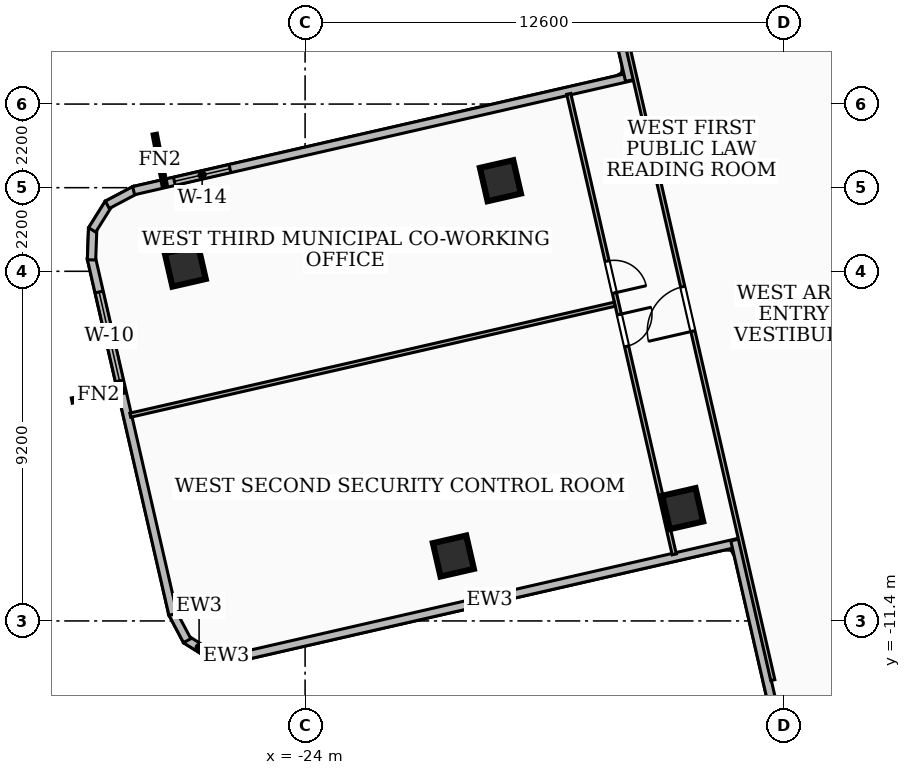
"""IFC4 building model, lengths in metres.
Left out: names, types, materials, properties, quantities, classifications, styles, units other than length and angle.
Written with IfcOpenShell. Run it as: python <this file> out.ifc"""

import sys

from ifc_helpers import new_model, si_unit, direction, frame, frame_2d, origin, origin_2d, place, context, subcontext, project, spatial, rectangle, extrude, element, fill, save


model = new_model("IFC4")
c1 = context("Model", 3, precision=1e-05, world=origin(), true_north=direction((0.0, 1.0)))
c2 = subcontext(c1, "Body", "Model", "MODEL_VIEW")
j1 = project(units=[si_unit("LENGTHUNIT", "METRE"), si_unit("PLANEANGLEUNIT", "RADIAN")], contexts=[c1])
p1 = place(None, origin())
s1 = spatial("IfcSite", under=j1, at=p1, CompositionType="ELEMENT")
p2 = place(p1, origin())
s2 = spatial("IfcBuilding", under=s1, at=p2, CompositionType="ELEMENT")
p3 = place(p2, frame((0.0, 0.0, 123.48)))
s3 = spatial("IfcBuildingStorey", under=s2, at=p3, CompositionType="ELEMENT", Elevation=123.48)
for number, where, z_axis, x_axis in (
    (1, (-18.86, 0.183, 0.0), (0.0, 0.0, 1.0), (0.975, 0.223, 0.0)),
    (2, (-14.064, -8.445, 0.0), (0.0, 0.0, 1.0), (0.975, 0.223, 0.0)),
    (3, (-27.153, -2.064, 0.0), (0.0, 0.0, 1.0), (0.975, 0.223, 0.0)),
    (4, (-20.098, -9.692, 0.0), (0.0, 0.0, 1.0), (0.975, 0.223, 0.0)),
):
    element("IfcColumn", number, at=place(p3, frame(where, z_axis=z_axis, x_axis=x_axis)), inside=s3, PredefinedType="COLUMN", context=c2, shape_type="SweptSolid", body=[
        extrude(rectangle(XDim=0.9, YDim=0.9, at=origin_2d()), origin(), (0.0, 0.0, 1.0), 3.6),
    ])
p4 = place(p3, frame((-12.585, -9.335, 0.0), z_axis=(0.0, 0.0, 1.0), x_axis=(-0.974754036658, -0.223281365141, 0.0)))
e5 = element("IfcWall", 5, at=p4, inside=s3, PredefinedType="SOLIDWALL", context=c2, shape_type="SweptSolid", body=[
    extrude(rectangle(XDim=13.459, YDim=0.22, at=frame_2d((6.729, 0.0))), origin(), (0.0, 0.0, 1.0), 2.644),
])
p5 = place(p3, frame((-25.655, -12.335, 0.0), z_axis=(0.0, 0.0, 1.0), x_axis=(-0.999352376715, 0.035983706773, 0.0)))
e6 = element("IfcWall", 6, at=p5, inside=s3, PredefinedType="SOLIDWALL", context=c2, shape_type="SweptSolid", body=[
    extrude(rectangle(XDim=0.834, YDim=0.22, at=frame_2d((0.417, 0.0))), origin(), (0.0, 0.0, 1.0), 3.34),
])
p6 = place(p3, frame((-26.443, -12.319, 0.0), z_axis=(0.0, 0.0, 1.0), x_axis=(-0.846889988853, 0.531768132536, 0.0)))
e7 = element("IfcWall", 7, at=p6, inside=s3, PredefinedType="SOLIDWALL", context=c2, shape_type="SweptSolid", body=[
    extrude(rectangle(XDim=0.818, YDim=0.22, at=frame_2d((0.409, 0.0))), origin(), (0.0, 0.0, 1.0), 3.34),
])
p7 = place(p3, frame((-27.103, -11.919, 0.0), z_axis=(0.0, 0.0, 1.0), x_axis=(-0.468506090516, 0.883460266876, 0.0)))
e8 = element("IfcWall", 8, at=p7, inside=s3, PredefinedType="SOLIDWALL", context=c2, shape_type="SweptSolid", body=[
    extrude(rectangle(XDim=0.834, YDim=0.22, at=frame_2d((0.417, 0.0))), origin(), (0.0, 0.0, 1.0), 3.34),
])
p8 = place(p3, frame((-27.476, -11.228, 0.0), z_axis=(0.0, 0.0, 1.0), x_axis=(-0.223358074049, 0.974736462208, 0.0)))
e9 = element("IfcWall", 9, at=p8, inside=s3, PredefinedType="SOLIDWALL", context=c2, shape_type="SweptSolid", body=[
    extrude(rectangle(XDim=9.621, YDim=0.22, at=frame_2d((4.811, 0.0))), origin(), (0.0, 0.0, 1.0), 3.34),
])
p9 = place(p8, frame((6.304, 0.0, 0.85)))
e10 = element("IfcOpeningElement", 10, at=p9, cuts=e9, PredefinedType="OPENING", context=c2, shape_type="SweptSolid", body=[
    extrude(rectangle(XDim=2.4, YDim=1.65, at=frame_2d((1.2, 0.825))), frame((0.0, 0.12, 0.0), z_axis=(0.0, -1.0, 0.0), x_axis=(1.0, 0.0, 0.0)), (0.0, 0.0, 1.0), 0.24),
])
p10 = place(p3, frame((-29.62, -1.899, 0.0), z_axis=(0.0, 0.0, 1.0), x_axis=(0.037195813461, 0.999307996296, 0.0)))
e11 = element("IfcWall", 11, at=p10, inside=s3, PredefinedType="SOLIDWALL", context=c2, shape_type="SweptSolid", body=[
    extrude(rectangle(XDim=0.833, YDim=0.22, at=frame_2d((0.417, 0.0))), origin(), (0.0, 0.0, 1.0), 3.34),
])
p11 = place(p3, frame((-29.603, -1.112, 0.0), z_axis=(0.0, 0.0, 1.0), x_axis=(0.530240177466, 0.847847482865, 0.0)))
e12 = element("IfcWall", 12, at=p11, inside=s3, PredefinedType="SOLIDWALL", context=c2, shape_type="SweptSolid", body=[
    extrude(rectangle(XDim=0.819, YDim=0.22, at=frame_2d((0.409, 0.0))), origin(), (0.0, 0.0, 1.0), 3.34),
])
p12 = place(p3, frame((-29.204, -0.451, 0.0), z_axis=(0.0, 0.0, 1.0), x_axis=(0.883716798585, 0.468022029287, 0.0)))
e13 = element("IfcWall", 13, at=p12, inside=s3, PredefinedType="SOLIDWALL", context=c2, shape_type="SweptSolid", body=[
    extrude(rectangle(XDim=0.835, YDim=0.22, at=frame_2d((0.417, 0.0))), origin(), (0.0, 0.0, 1.0), 3.34),
])
p13 = place(p3, frame((-28.512, -0.078, 0.0), z_axis=(0.0, 0.0, 1.0), x_axis=(0.974753462872, 0.223283870038, 0.0)))
e14 = element("IfcWall", 14, at=p13, inside=s3, PredefinedType="SOLIDWALL", context=c2, shape_type="SweptSolid", body=[
    extrude(rectangle(XDim=13.458, YDim=0.22, at=frame_2d((6.729, 0.0))), origin(), (0.0, 0.0, 1.0), 3.34),
])
p14 = place(p13, frame((1.1, 0.0, 0.85)))
e15 = element("IfcOpeningElement", 15, at=p14, cuts=e14, PredefinedType="OPENING", context=c2, shape_type="SweptSolid", body=[
    extrude(rectangle(XDim=1.5, YDim=1.5, at=frame_2d((0.75, 0.75))), frame((0.0, 0.12, 0.0), z_axis=(0.0, -1.0, 0.0), x_axis=(1.0, 0.0, 0.0)), (0.0, 0.0, 1.0), 0.24),
])
p15 = place(p3, frame((-15.46, 2.821, 0.0), z_axis=(0.0, 0.0, 1.0), x_axis=(-0.223278912438, 0.974754598481, 0.0)))
e16 = element("IfcWall", 16, at=p15, inside=s3, PredefinedType="SOLIDWALL", context=c2, shape_type="SweptSolid", body=[
    extrude(rectangle(XDim=6.759, YDim=0.22, at=frame_2d((3.379, 0.0))), origin(), (0.0, 0.0, 1.0), 3.34),
])
p16 = place(p3, frame((-11.182, -15.857, 0.0), z_axis=(0.0, 0.0, 1.0), x_axis=(-0.223278912438, 0.974754598481, 0.0)))
e17 = element("IfcWall", 17, at=p16, inside=s3, PredefinedType="SOLIDWALL", context=c2, shape_type="SweptSolid", body=[
    extrude(rectangle(XDim=6.759, YDim=0.22, at=frame_2d((3.379, 0.0))), origin(), (0.0, 0.0, 1.0), 2.644),
])
p17 = place(p3, frame((-6.512, -10.38, 0.0), z_axis=(0.0, 0.0, 1.0), x_axis=(-0.531323053356, -0.847169294163, 0.0)))
e18 = element("IfcWall", 18, at=p17, inside=s3, PredefinedType="PARTITIONING", context=c2, shape_type="SweptSolid", body=[
    extrude(rectangle(XDim=7.421, YDim=0.11, at=frame_2d((3.711, 0.0))), origin(), (0.0, 0.0, 1.0), 2.57),
])
p18 = place(p3, frame((-11.692, -12.957, 0.0), z_axis=(0.0, 0.0, 1.0), x_axis=(-0.223262093598, 0.97475845088, 0.0)))
e19 = element("IfcWall", 19, at=p18, inside=s3, PredefinedType="PARTITIONING", context=c2, shape_type="SweptSolid", body=[
    extrude(rectangle(XDim=20.04, YDim=0.11, at=frame_2d((10.02, 0.0))), origin(), (0.0, 0.0, 1.0), 2.57),
])
p19 = place(p18, frame((9.42, 0.0, 0.0)))
e20 = element("IfcOpeningElement", 20, at=p19, cuts=e19, PredefinedType="OPENING", context=c2, shape_type="SweptSolid", body=[
    extrude(rectangle(XDim=1.2, YDim=2.1, at=frame_2d((0.6, 1.05))), frame((0.0, 0.065, 0.0), z_axis=(0.0, -1.0, 0.0), x_axis=(1.0, 0.0, 0.0)), (0.0, 0.0, 1.0), 0.13),
])
p20 = place(p3, frame((-15.855, -3.067, 0.0), z_axis=(0.0, 0.0, 1.0), x_axis=(-0.974758398925, -0.223262320434, 0.0)))
e21 = element("IfcWall", 21, at=p20, inside=s3, PredefinedType="PARTITIONING", context=c2, shape_type="SweptSolid", body=[
    extrude(rectangle(XDim=13.075, YDim=0.11, at=frame_2d((6.538, 0.0))), origin(), (0.0, 0.0, 1.0), 2.72),
])
p21 = place(p3, frame((-17.062, 2.468, 0.0), z_axis=(0.0, 0.0, 1.0), x_axis=(0.223341555051, -0.974740247341, 0.0)))
e22 = element("IfcWall", 22, at=p21, inside=s3, PredefinedType="PARTITIONING", context=c2, shape_type="SweptSolid", body=[
    extrude(rectangle(XDim=12.43, YDim=0.11, at=frame_2d((6.215, 0.0))), origin(), (0.0, 0.0, 1.0), 2.57),
])
p22 = place(p21, frame((4.515, 0.0, 0.0)))
e23 = element("IfcOpeningElement", 23, at=p22, cuts=e22, PredefinedType="OPENING", context=c2, shape_type="SweptSolid", body=[
    extrude(rectangle(XDim=0.86, YDim=2.04, at=frame_2d((0.43, 1.02))), frame((0.0, 0.065, 0.0), z_axis=(0.0, -1.0, 0.0), x_axis=(1.0, 0.0, 0.0)), (0.0, 0.0, 1.0), 0.13),
])
p23 = place(p21, frame((5.955, 0.0, 0.0)))
e24 = element("IfcOpeningElement", 24, at=p23, cuts=e22, PredefinedType="OPENING", context=c2, shape_type="SweptSolid", body=[
    extrude(rectangle(XDim=0.86, YDim=2.04, at=frame_2d((0.43, 1.02))), frame((0.0, 0.065, 0.0), z_axis=(0.0, -1.0, 0.0), x_axis=(1.0, 0.0, 0.0)), (0.0, 0.0, 1.0), 0.13),
])
p24 = place(p9, origin())
e25 = element("IfcWindow", 25, at=p24, inside=s3, PartitioningType="SINGLE_PANEL", PredefinedType="WINDOW", context=c2, shape_type="SweptSolid", body=[
    extrude(rectangle(XDim=2.4, YDim=1.65, at=frame_2d((1.2, 0.825))), frame((0.0, 0.03, 0.0), z_axis=(0.0, -1.0, 0.0), x_axis=(1.0, 0.0, 0.0)), (0.0, 0.0, 1.0), 0.06),
])
fill(e10, e25)
p25 = place(p14, origin())
e26 = element("IfcWindow", 26, at=p25, inside=s3, PartitioningType="SINGLE_PANEL", PredefinedType="WINDOW", context=c2, shape_type="SweptSolid", body=[
    extrude(rectangle(XDim=1.5, YDim=1.5, at=frame_2d((0.75, 0.75))), frame((0.0, 0.03, 0.0), z_axis=(0.0, -1.0, 0.0), x_axis=(1.0, 0.0, 0.0)), (0.0, 0.0, 1.0), 0.06),
])
fill(e15, e26)
p26 = place(p19, origin())
e27 = element("IfcDoor", 27, at=p26, inside=s3, OperationType="SINGLE_SWING_LEFT", PredefinedType="DOOR", context=c2, shape_type="SweptSolid", body=[
    extrude(rectangle(XDim=1.2, YDim=2.1, at=frame_2d((0.6, 1.05))), frame((0.0, 0.025, 0.0), z_axis=(0.0, -1.0, 0.0), x_axis=(1.0, 0.0, 0.0)), (0.0, 0.0, 1.0), 0.05),
])
fill(e20, e27)
p27 = place(p22, origin())
e28 = element("IfcDoor", 28, at=p27, inside=s3, OperationType="SINGLE_SWING_RIGHT", PredefinedType="DOOR", context=c2, shape_type="SweptSolid", body=[
    extrude(rectangle(XDim=0.86, YDim=2.04, at=frame_2d((0.43, 1.02))), frame((0.0, 0.025, 0.0), z_axis=(0.0, -1.0, 0.0), x_axis=(1.0, 0.0, 0.0)), (0.0, 0.0, 1.0), 0.05),
])
fill(e23, e28)
p28 = place(p23, origin())
e29 = element("IfcDoor", 29, at=p28, inside=s3, OperationType="SINGLE_SWING_LEFT", PredefinedType="DOOR", context=c2, shape_type="SweptSolid", body=[
    extrude(rectangle(XDim=0.86, YDim=2.04, at=frame_2d((0.43, 1.02))), frame((0.0, 0.025, 0.0), z_axis=(0.0, -1.0, 0.0), x_axis=(1.0, 0.0, 0.0)), (0.0, 0.0, 1.0), 0.05),
])
fill(e24, e29)
save(model, sys.argv[1])
